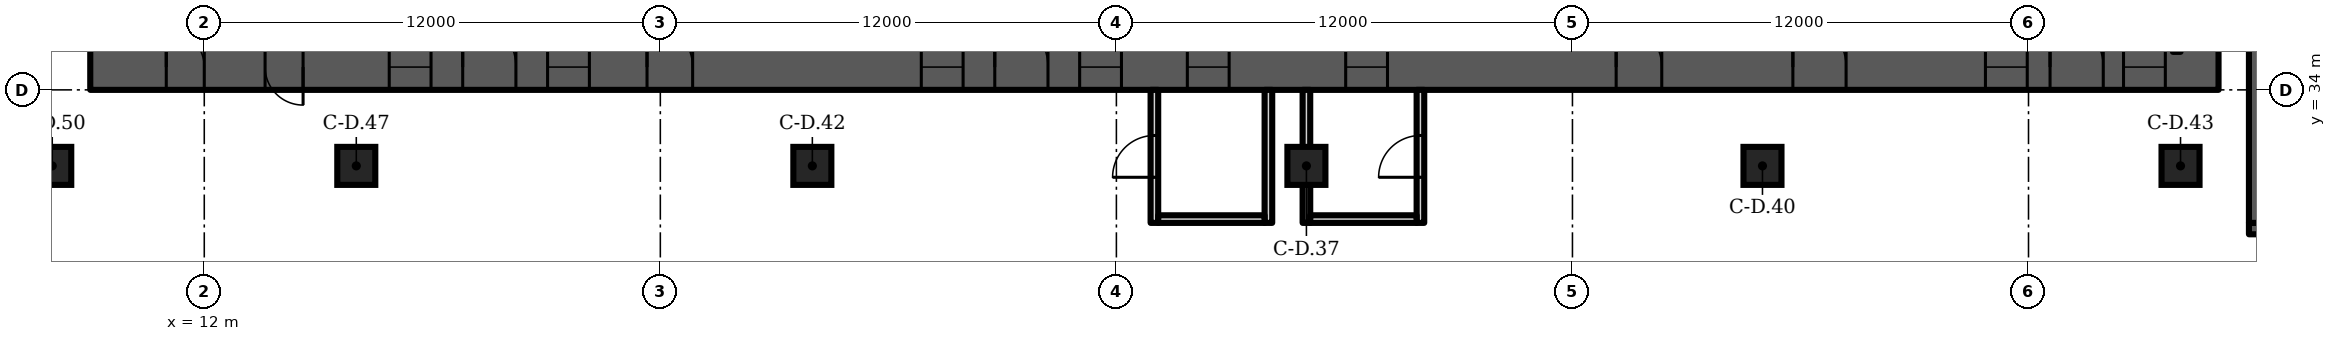
"""IFC4 building model, lengths in metres.
Left out: names, types, materials, properties, quantities, classifications, styles, units other than length and angle.
Written with IfcOpenShell. Run it as: python <this file> out.ifc"""

import sys

from ifc_helpers import new_model, si_unit, direction, frame, frame_2d, origin, origin_2d, place, context, subcontext, project, spatial, rectangle, extrude, element, fill, save


model = new_model("IFC4")
c1 = context("Model", 3, precision=1e-05, world=origin(), true_north=direction((0.0, 1.0)))
c2 = subcontext(c1, "Body", "Model", "MODEL_VIEW")
j1 = project(units=[si_unit("LENGTHUNIT", "METRE"), si_unit("PLANEANGLEUNIT", "RADIAN")], contexts=[c1])
p1 = place(None, origin())
s1 = spatial("IfcSite", under=j1, at=p1, CompositionType="ELEMENT")
p2 = place(p1, origin())
s2 = spatial("IfcBuilding", under=s1, at=p2, CompositionType="ELEMENT")
p3 = place(p2, frame((0.0, 0.0, 21.5)))
s3 = spatial("IfcBuildingStorey", under=s2, at=p3, CompositionType="ELEMENT", Elevation=21.5)
for number, where, z_axis, x_axis in (
    (1, (41.0, 32.0, 0.0), (0.0, 0.0, 1.0), (1.0, 0.0, 0.0)),
    (2, (53.0, 32.0, 0.0), (0.0, 0.0, 1.0), (1.0, 0.0, 0.0)),
    (3, (28.0, 32.0, 0.0), (0.0, 0.0, 1.0), (1.0, 0.0, 0.0)),
    (4, (64.0, 32.0, 0.0), (0.0, 0.0, 1.0), (1.0, 0.0, 0.0)),
    (5, (16.0, 32.0, 0.0), (0.0, 0.0, 1.0), (1.0, 0.0, 0.0)),
    (6, (8.0, 32.0, 0.0), (0.0, 0.0, 1.0), (1.0, 0.0, 0.0)),
):
    element("IfcColumn", number, at=place(p3, frame(where, z_axis=z_axis, x_axis=x_axis)), inside=s3, PredefinedType="COLUMN", context=c2, shape_type="SweptSolid", body=[
        extrude(rectangle(XDim=1.0, YDim=1.0, at=origin_2d()), origin(), (0.0, 0.0, 1.0), 6.0),
    ])
p4 = place(p3, frame((9.0, 34.6, 0.0), z_axis=(0.0, 0.0, 1.0), x_axis=(1.0, 0.0, 0.0)))
e7 = element("IfcWall", 7, at=p4, inside=s3, PredefinedType="SHEAR", context=c2, shape_type="SweptSolid", body=[
    extrude(rectangle(XDim=56.0, YDim=1.2, at=frame_2d((28.0, 0.0))), origin(), (0.0, 0.0, 1.0), 5.7),
])
p5 = place(p4, frame((2.0, 0.0, 0.0)))
e8 = element("IfcOpeningElement", 8, at=p5, cuts=e7, PredefinedType="OPENING", context=c2, shape_type="SweptSolid", body=[
    extrude(rectangle(XDim=1.0, YDim=2.1, at=frame_2d((0.5, 1.05))), frame((0.0, 0.61, 0.0), z_axis=(0.0, -1.0, 0.0), x_axis=(1.0, 0.0, 0.0)), (0.0, 0.0, 1.0), 1.22),
])
p6 = place(p4, frame((4.6, 0.0, 0.0)))
e9 = element("IfcOpeningElement", 9, at=p6, cuts=e7, PredefinedType="OPENING", context=c2, shape_type="SweptSolid", body=[
    extrude(rectangle(XDim=1.0, YDim=2.1, at=frame_2d((0.5, 1.05))), frame((0.0, 0.61, 0.0), z_axis=(0.0, -1.0, 0.0), x_axis=(1.0, 0.0, 0.0)), (0.0, 0.0, 1.0), 1.22),
])
p7 = place(p4, frame((7.867, 0.0, 0.0)))
e10 = element("IfcOpeningElement", 10, at=p7, cuts=e7, PredefinedType="OPENING", context=c2, shape_type="SweptSolid", body=[
    extrude(rectangle(XDim=1.1, YDim=2.1, at=frame_2d((0.55, 1.05))), frame((0.0, 0.61, 0.0), z_axis=(0.0, -1.0, 0.0), x_axis=(1.0, 0.0, 0.0)), (0.0, 0.0, 1.0), 1.22),
])
p8 = place(p4, frame((12.033, 0.0, 0.0)))
e11 = element("IfcOpeningElement", 11, at=p8, cuts=e7, PredefinedType="OPENING", context=c2, shape_type="SweptSolid", body=[
    extrude(rectangle(XDim=1.1, YDim=2.1, at=frame_2d((0.55, 1.05))), frame((0.0, 0.61, 0.0), z_axis=(0.0, -1.0, 0.0), x_axis=(1.0, 0.0, 0.0)), (0.0, 0.0, 1.0), 1.22),
])
p9 = place(p4, frame((9.8, 0.0, 0.0)))
e12 = element("IfcOpeningElement", 12, at=p9, cuts=e7, PredefinedType="OPENING", context=c2, shape_type="SweptSolid", body=[
    extrude(rectangle(XDim=1.4, YDim=2.1, at=frame_2d((0.7, 1.05))), frame((0.0, 0.61, 0.0), z_axis=(0.0, -1.0, 0.0), x_axis=(1.0, 0.0, 0.0)), (0.0, 0.0, 1.0), 1.22),
])
p10 = place(p4, frame((14.65, 0.0, 0.0)))
e13 = element("IfcOpeningElement", 13, at=p10, cuts=e7, PredefinedType="OPENING", context=c2, shape_type="SweptSolid", body=[
    extrude(rectangle(XDim=1.2, YDim=2.1, at=frame_2d((0.6, 1.05))), frame((0.0, 0.61, 0.0), z_axis=(0.0, -1.0, 0.0), x_axis=(1.0, 0.0, 0.0)), (0.0, 0.0, 1.0), 1.22),
])
p11 = place(p4, frame((21.867, 0.0, 0.0)))
e14 = element("IfcOpeningElement", 14, at=p11, cuts=e7, PredefinedType="OPENING", context=c2, shape_type="SweptSolid", body=[
    extrude(rectangle(XDim=1.1, YDim=2.1, at=frame_2d((0.55, 1.05))), frame((0.0, 0.61, 0.0), z_axis=(0.0, -1.0, 0.0), x_axis=(1.0, 0.0, 0.0)), (0.0, 0.0, 1.0), 1.22),
])
p12 = place(p4, frame((26.033, 0.0, 0.0)))
e15 = element("IfcOpeningElement", 15, at=p12, cuts=e7, PredefinedType="OPENING", context=c2, shape_type="SweptSolid", body=[
    extrude(rectangle(XDim=1.1, YDim=2.1, at=frame_2d((0.55, 1.05))), frame((0.0, 0.61, 0.0), z_axis=(0.0, -1.0, 0.0), x_axis=(1.0, 0.0, 0.0)), (0.0, 0.0, 1.0), 1.22),
])
p13 = place(p4, frame((23.8, 0.0, 0.0)))
e16 = element("IfcOpeningElement", 16, at=p13, cuts=e7, PredefinedType="OPENING", context=c2, shape_type="SweptSolid", body=[
    extrude(rectangle(XDim=1.4, YDim=2.1, at=frame_2d((0.7, 1.05))), frame((0.0, 0.61, 0.0), z_axis=(0.0, -1.0, 0.0), x_axis=(1.0, 0.0, 0.0)), (0.0, 0.0, 1.0), 1.22),
])
p14 = place(p4, frame((28.867, 0.0, 0.0)))
e17 = element("IfcOpeningElement", 17, at=p14, cuts=e7, PredefinedType="OPENING", context=c2, shape_type="SweptSolid", body=[
    extrude(rectangle(XDim=1.1, YDim=2.1, at=frame_2d((0.55, 1.05))), frame((0.0, 0.61, 0.0), z_axis=(0.0, -1.0, 0.0), x_axis=(1.0, 0.0, 0.0)), (0.0, 0.0, 1.0), 1.22),
])
p15 = place(p4, frame((33.033, 0.0, 0.0)))
e18 = element("IfcOpeningElement", 18, at=p15, cuts=e7, PredefinedType="OPENING", context=c2, shape_type="SweptSolid", body=[
    extrude(rectangle(XDim=1.1, YDim=2.1, at=frame_2d((0.55, 1.05))), frame((0.0, 0.61, 0.0), z_axis=(0.0, -1.0, 0.0), x_axis=(1.0, 0.0, 0.0)), (0.0, 0.0, 1.0), 1.22),
])
p16 = place(p4, frame((40.15, 0.0, 0.0)))
e19 = element("IfcOpeningElement", 19, at=p16, cuts=e7, PredefinedType="OPENING", context=c2, shape_type="SweptSolid", body=[
    extrude(rectangle(XDim=1.2, YDim=2.1, at=frame_2d((0.6, 1.05))), frame((0.0, 0.61, 0.0), z_axis=(0.0, -1.0, 0.0), x_axis=(1.0, 0.0, 0.0)), (0.0, 0.0, 1.0), 1.22),
])
p17 = place(p4, frame((44.8, 0.0, 0.0)))
e20 = element("IfcOpeningElement", 20, at=p17, cuts=e7, PredefinedType="OPENING", context=c2, shape_type="SweptSolid", body=[
    extrude(rectangle(XDim=1.4, YDim=2.1, at=frame_2d((0.7, 1.05))), frame((0.0, 0.61, 0.0), z_axis=(0.0, -1.0, 0.0), x_axis=(1.0, 0.0, 0.0)), (0.0, 0.0, 1.0), 1.22),
])
p18 = place(p4, frame((49.867, 0.0, 0.0)))
e21 = element("IfcOpeningElement", 21, at=p18, cuts=e7, PredefinedType="OPENING", context=c2, shape_type="SweptSolid", body=[
    extrude(rectangle(XDim=1.1, YDim=2.1, at=frame_2d((0.55, 1.05))), frame((0.0, 0.61, 0.0), z_axis=(0.0, -1.0, 0.0), x_axis=(1.0, 0.0, 0.0)), (0.0, 0.0, 1.0), 1.22),
])
p19 = place(p4, frame((53.5, 0.0, 0.0)))
e22 = element("IfcOpeningElement", 22, at=p19, cuts=e7, PredefinedType="OPENING", context=c2, shape_type="SweptSolid", body=[
    extrude(rectangle(XDim=1.1, YDim=2.1, at=frame_2d((0.55, 1.05))), frame((0.0, 0.61, 0.0), z_axis=(0.0, -1.0, 0.0), x_axis=(1.0, 0.0, 0.0)), (0.0, 0.0, 1.0), 1.22),
])
p20 = place(p4, frame((51.567, 0.0, 0.0)))
e23 = element("IfcOpeningElement", 23, at=p20, cuts=e7, PredefinedType="OPENING", context=c2, shape_type="SweptSolid", body=[
    extrude(rectangle(XDim=1.4, YDim=2.1, at=frame_2d((0.7, 1.05))), frame((0.0, 0.61, 0.0), z_axis=(0.0, -1.0, 0.0), x_axis=(1.0, 0.0, 0.0)), (0.0, 0.0, 1.0), 1.22),
])
p21 = place(p3, frame((37.0, 30.5, 0.0), z_axis=(0.0, 0.0, 1.0), x_axis=(0.0, 1.0, 0.0)))
e24 = element("IfcWall", 24, at=p21, inside=s3, PredefinedType="PARTITIONING", context=c2, shape_type="SweptSolid", body=[
    extrude(rectangle(XDim=3.5, YDim=0.2, at=frame_2d((1.75, 0.0))), origin(), (0.0, 0.0, 1.0), 5.7),
])
p22 = place(p21, frame((1.2, 0.0, 0.0)))
e25 = element("IfcOpeningElement", 25, at=p22, cuts=e24, PredefinedType="OPENING", context=c2, shape_type="SweptSolid", body=[
    extrude(rectangle(XDim=1.1, YDim=2.1, at=frame_2d((0.55, 1.05))), frame((0.0, 0.11, 0.0), z_axis=(0.0, -1.0, 0.0), x_axis=(1.0, 0.0, 0.0)), (0.0, 0.0, 1.0), 0.22),
])
p23 = place(p3, frame((40.0, 30.5, 0.0), z_axis=(0.0, 0.0, 1.0), x_axis=(0.0, 1.0, 0.0)))
e26 = element("IfcWall", 26, at=p23, inside=s3, PredefinedType="PARTITIONING", context=c2, shape_type="SweptSolid", body=[
    extrude(rectangle(XDim=3.5, YDim=0.2, at=frame_2d((1.75, 0.0))), origin(), (0.0, 0.0, 1.0), 5.7),
])
p24 = place(p3, frame((37.1, 30.6, 0.0), z_axis=(0.0, 0.0, 1.0), x_axis=(1.0, 0.0, 0.0)))
e27 = element("IfcWall", 27, at=p24, inside=s3, PredefinedType="PARTITIONING", context=c2, shape_type="SweptSolid", body=[
    extrude(rectangle(XDim=2.8, YDim=0.2, at=frame_2d((1.4, 0.0))), origin(), (0.0, 0.0, 1.0), 5.7),
])
p25 = place(p3, frame((41.0, 30.5, 0.0), z_axis=(0.0, 0.0, 1.0), x_axis=(0.0, 1.0, 0.0)))
e28 = element("IfcWall", 28, at=p25, inside=s3, PredefinedType="PARTITIONING", context=c2, shape_type="SweptSolid", body=[
    extrude(rectangle(XDim=3.5, YDim=0.2, at=frame_2d((1.75, 0.0))), origin(), (0.0, 0.0, 1.0), 5.7),
])
p26 = place(p3, frame((44.0, 30.5, 0.0), z_axis=(0.0, 0.0, 1.0), x_axis=(0.0, 1.0, 0.0)))
e29 = element("IfcWall", 29, at=p26, inside=s3, PredefinedType="PARTITIONING", context=c2, shape_type="SweptSolid", body=[
    extrude(rectangle(XDim=3.5, YDim=0.2, at=frame_2d((1.75, 0.0))), origin(), (0.0, 0.0, 1.0), 5.7),
])
p27 = place(p26, frame((1.2, 0.0, 0.0)))
e30 = element("IfcOpeningElement", 30, at=p27, cuts=e29, PredefinedType="OPENING", context=c2, shape_type="SweptSolid", body=[
    extrude(rectangle(XDim=1.1, YDim=2.1, at=frame_2d((0.55, 1.05))), frame((0.0, 0.11, 0.0), z_axis=(0.0, -1.0, 0.0), x_axis=(1.0, 0.0, 0.0)), (0.0, 0.0, 1.0), 0.22),
])
p28 = place(p3, frame((41.1, 30.6, 0.0), z_axis=(0.0, 0.0, 1.0), x_axis=(1.0, 0.0, 0.0)))
e31 = element("IfcWall", 31, at=p28, inside=s3, PredefinedType="PARTITIONING", context=c2, shape_type="SweptSolid", body=[
    extrude(rectangle(XDim=2.8, YDim=0.2, at=frame_2d((1.4, 0.0))), origin(), (0.0, 0.0, 1.0), 5.7),
])
p29 = place(p3, frame((65.8, 30.35, 0.0), z_axis=(0.0, 0.0, 1.0), x_axis=(1.0, 0.0, 0.0)))
e32 = element("IfcWall", 32, at=p29, inside=s3, PredefinedType="SHEAR", context=c2, shape_type="SweptSolid", body=[
    extrude(rectangle(XDim=5.55, YDim=0.3, at=frame_2d((2.775, 0.0))), origin(), (0.0, 0.0, 1.0), 5.7),
])
p30 = place(p29, frame((1.575, 0.0, 0.0)))
e33 = element("IfcOpeningElement", 33, at=p30, cuts=e32, PredefinedType="OPENING", context=c2, shape_type="SweptSolid", body=[
    extrude(rectangle(XDim=2.4, YDim=2.1, at=frame_2d((1.2, 1.05))), frame((0.0, 0.16, 0.0), z_axis=(0.0, -1.0, 0.0), x_axis=(1.0, 0.0, 0.0)), (0.0, 0.0, 1.0), 0.32),
])
p31 = place(p3, frame((65.95, 30.5, 0.0), z_axis=(0.0, 0.0, 1.0), x_axis=(0.0, 1.0, 0.0)))
e34 = element("IfcWall", 34, at=p31, inside=s3, PredefinedType="SHEAR", context=c2, shape_type="SweptSolid", body=[
    extrude(rectangle(XDim=8.4, YDim=0.3, at=frame_2d((4.2, 0.0))), origin(), (0.0, 0.0, 1.0), 5.7),
])
p32 = place(p5, origin())
e35 = element("IfcDoor", 35, at=p32, inside=s3, OperationType="SINGLE_SWING_LEFT", PredefinedType="DOOR", context=c2, shape_type="SweptSolid", body=[
    extrude(rectangle(XDim=1.0, YDim=2.1, at=frame_2d((0.5, 1.05))), frame((0.0, 0.6, 0.0), z_axis=(0.0, -1.0, 0.0), x_axis=(1.0, 0.0, 0.0)), (0.0, 0.0, 1.0), 1.199),
])
fill(e8, e35)
p33 = place(p6, origin())
e36 = element("IfcDoor", 36, at=p33, inside=s3, OperationType="SINGLE_SWING_RIGHT", PredefinedType="DOOR", context=c2, shape_type="SweptSolid", body=[
    extrude(rectangle(XDim=1.0, YDim=2.1, at=frame_2d((0.5, 1.05))), frame((0.0, 0.6, 0.0), z_axis=(0.0, -1.0, 0.0), x_axis=(1.0, 0.0, 0.0)), (0.0, 0.0, 1.0), 1.199),
])
fill(e9, e36)
p34 = place(p7, origin())
e37 = element("IfcDoor", 37, at=p34, inside=s3, OperationType="DOUBLE_DOOR_SLIDING", PredefinedType="DOOR", context=c2, shape_type="SweptSolid", body=[
    extrude(rectangle(XDim=1.1, YDim=2.1, at=frame_2d((0.55, 1.05))), frame((0.0, 0.025, 0.0), z_axis=(0.0, -1.0, 0.0), x_axis=(1.0, 0.0, 0.0)), (0.0, 0.0, 1.0), 0.05),
])
fill(e10, e37)
p35 = place(p8, origin())
e38 = element("IfcDoor", 38, at=p35, inside=s3, OperationType="DOUBLE_DOOR_SLIDING", PredefinedType="DOOR", context=c2, shape_type="SweptSolid", body=[
    extrude(rectangle(XDim=1.1, YDim=2.1, at=frame_2d((0.55, 1.05))), frame((0.0, 0.025, 0.0), z_axis=(0.0, -1.0, 0.0), x_axis=(1.0, 0.0, 0.0)), (0.0, 0.0, 1.0), 0.05),
])
fill(e11, e38)
p36 = place(p9, origin())
e39 = element("IfcDoor", 39, at=p36, inside=s3, OperationType="DOUBLE_DOOR_SINGLE_SWING", PredefinedType="DOOR", context=c2, shape_type="SweptSolid", body=[
    extrude(rectangle(XDim=1.4, YDim=2.1, at=frame_2d((0.7, 1.05))), frame((0.0, 0.025, 0.0), z_axis=(0.0, -1.0, 0.0), x_axis=(1.0, 0.0, 0.0)), (0.0, 0.0, 1.0), 0.05),
])
fill(e12, e39)
p37 = place(p10, origin())
e40 = element("IfcDoor", 40, at=p37, inside=s3, OperationType="SINGLE_SWING_LEFT", PredefinedType="DOOR", context=c2, shape_type="SweptSolid", body=[
    extrude(rectangle(XDim=1.2, YDim=2.1, at=frame_2d((0.6, 1.05))), frame((0.0, 0.025, 0.0), z_axis=(0.0, -1.0, 0.0), x_axis=(1.0, 0.0, 0.0)), (0.0, 0.0, 1.0), 0.05),
])
fill(e13, e40)
p38 = place(p11, origin())
e41 = element("IfcDoor", 41, at=p38, inside=s3, OperationType="DOUBLE_DOOR_SLIDING", PredefinedType="DOOR", context=c2, shape_type="SweptSolid", body=[
    extrude(rectangle(XDim=1.1, YDim=2.1, at=frame_2d((0.55, 1.05))), frame((0.0, 0.025, 0.0), z_axis=(0.0, -1.0, 0.0), x_axis=(1.0, 0.0, 0.0)), (0.0, 0.0, 1.0), 0.05),
])
fill(e14, e41)
p39 = place(p12, origin())
e42 = element("IfcDoor", 42, at=p39, inside=s3, OperationType="DOUBLE_DOOR_SLIDING", PredefinedType="DOOR", context=c2, shape_type="SweptSolid", body=[
    extrude(rectangle(XDim=1.1, YDim=2.1, at=frame_2d((0.55, 1.05))), frame((0.0, 0.025, 0.0), z_axis=(0.0, -1.0, 0.0), x_axis=(1.0, 0.0, 0.0)), (0.0, 0.0, 1.0), 0.05),
])
fill(e15, e42)
p40 = place(p13, origin())
e43 = element("IfcDoor", 43, at=p40, inside=s3, OperationType="DOUBLE_DOOR_SINGLE_SWING", PredefinedType="DOOR", context=c2, shape_type="SweptSolid", body=[
    extrude(rectangle(XDim=1.4, YDim=2.1, at=frame_2d((0.7, 1.05))), frame((0.0, 0.025, 0.0), z_axis=(0.0, -1.0, 0.0), x_axis=(1.0, 0.0, 0.0)), (0.0, 0.0, 1.0), 0.05),
])
fill(e16, e43)
p41 = place(p14, origin())
e44 = element("IfcDoor", 44, at=p41, inside=s3, OperationType="DOUBLE_DOOR_SLIDING", PredefinedType="DOOR", context=c2, shape_type="SweptSolid", body=[
    extrude(rectangle(XDim=1.1, YDim=2.1, at=frame_2d((0.55, 1.05))), frame((0.0, 0.025, 0.0), z_axis=(0.0, -1.0, 0.0), x_axis=(1.0, 0.0, 0.0)), (0.0, 0.0, 1.0), 0.05),
])
fill(e17, e44)
p42 = place(p15, origin())
e45 = element("IfcDoor", 45, at=p42, inside=s3, OperationType="DOUBLE_DOOR_SLIDING", PredefinedType="DOOR", context=c2, shape_type="SweptSolid", body=[
    extrude(rectangle(XDim=1.1, YDim=2.1, at=frame_2d((0.55, 1.05))), frame((0.0, 0.025, 0.0), z_axis=(0.0, -1.0, 0.0), x_axis=(1.0, 0.0, 0.0)), (0.0, 0.0, 1.0), 0.05),
])
fill(e18, e45)
p43 = place(p16, origin())
e46 = element("IfcDoor", 46, at=p43, inside=s3, OperationType="SINGLE_SWING_LEFT", PredefinedType="DOOR", context=c2, shape_type="SweptSolid", body=[
    extrude(rectangle(XDim=1.2, YDim=2.1, at=frame_2d((0.6, 1.05))), frame((0.0, 0.025, 0.0), z_axis=(0.0, -1.0, 0.0), x_axis=(1.0, 0.0, 0.0)), (0.0, 0.0, 1.0), 0.05),
])
fill(e19, e46)
p44 = place(p17, origin())
e47 = element("IfcDoor", 47, at=p44, inside=s3, OperationType="DOUBLE_DOOR_SINGLE_SWING", PredefinedType="DOOR", context=c2, shape_type="SweptSolid", body=[
    extrude(rectangle(XDim=1.4, YDim=2.1, at=frame_2d((0.7, 1.05))), frame((0.0, 0.025, 0.0), z_axis=(0.0, -1.0, 0.0), x_axis=(1.0, 0.0, 0.0)), (0.0, 0.0, 1.0), 0.05),
])
fill(e20, e47)
p45 = place(p18, origin())
e48 = element("IfcDoor", 48, at=p45, inside=s3, OperationType="DOUBLE_DOOR_SLIDING", PredefinedType="DOOR", context=c2, shape_type="SweptSolid", body=[
    extrude(rectangle(XDim=1.1, YDim=2.1, at=frame_2d((0.55, 1.05))), frame((0.0, 0.025, 0.0), z_axis=(0.0, -1.0, 0.0), x_axis=(1.0, 0.0, 0.0)), (0.0, 0.0, 1.0), 0.05),
])
fill(e21, e48)
p46 = place(p19, origin())
e49 = element("IfcDoor", 49, at=p46, inside=s3, OperationType="DOUBLE_DOOR_SLIDING", PredefinedType="DOOR", context=c2, shape_type="SweptSolid", body=[
    extrude(rectangle(XDim=1.1, YDim=2.1, at=frame_2d((0.55, 1.05))), frame((0.0, 0.025, 0.0), z_axis=(0.0, -1.0, 0.0), x_axis=(1.0, 0.0, 0.0)), (0.0, 0.0, 1.0), 0.05),
])
fill(e22, e49)
p47 = place(p20, origin())
e50 = element("IfcDoor", 50, at=p47, inside=s3, OperationType="DOUBLE_DOOR_SINGLE_SWING", PredefinedType="DOOR", context=c2, shape_type="SweptSolid", body=[
    extrude(rectangle(XDim=1.4, YDim=2.1, at=frame_2d((0.7, 1.05))), frame((0.0, 0.025, 0.0), z_axis=(0.0, -1.0, 0.0), x_axis=(1.0, 0.0, 0.0)), (0.0, 0.0, 1.0), 0.05),
])
fill(e23, e50)
p48 = place(p22, origin())
e51 = element("IfcDoor", 51, at=p48, inside=s3, OperationType="SINGLE_SWING_LEFT", PredefinedType="DOOR", context=c2, shape_type="SweptSolid", body=[
    extrude(rectangle(XDim=1.1, YDim=2.1, at=frame_2d((0.55, 1.05))), frame((0.0, 0.025, 0.0), z_axis=(0.0, -1.0, 0.0), x_axis=(1.0, 0.0, 0.0)), (0.0, 0.0, 1.0), 0.05),
])
fill(e25, e51)
p49 = place(p27, origin())
e52 = element("IfcDoor", 52, at=p49, inside=s3, OperationType="SINGLE_SWING_LEFT", PredefinedType="DOOR", context=c2, shape_type="SweptSolid", body=[
    extrude(rectangle(XDim=1.1, YDim=2.1, at=frame_2d((0.55, 1.05))), frame((0.0, 0.025, 0.0), z_axis=(0.0, -1.0, 0.0), x_axis=(1.0, 0.0, 0.0)), (0.0, 0.0, 1.0), 0.05),
])
fill(e30, e52)
save(model, sys.argv[1])
